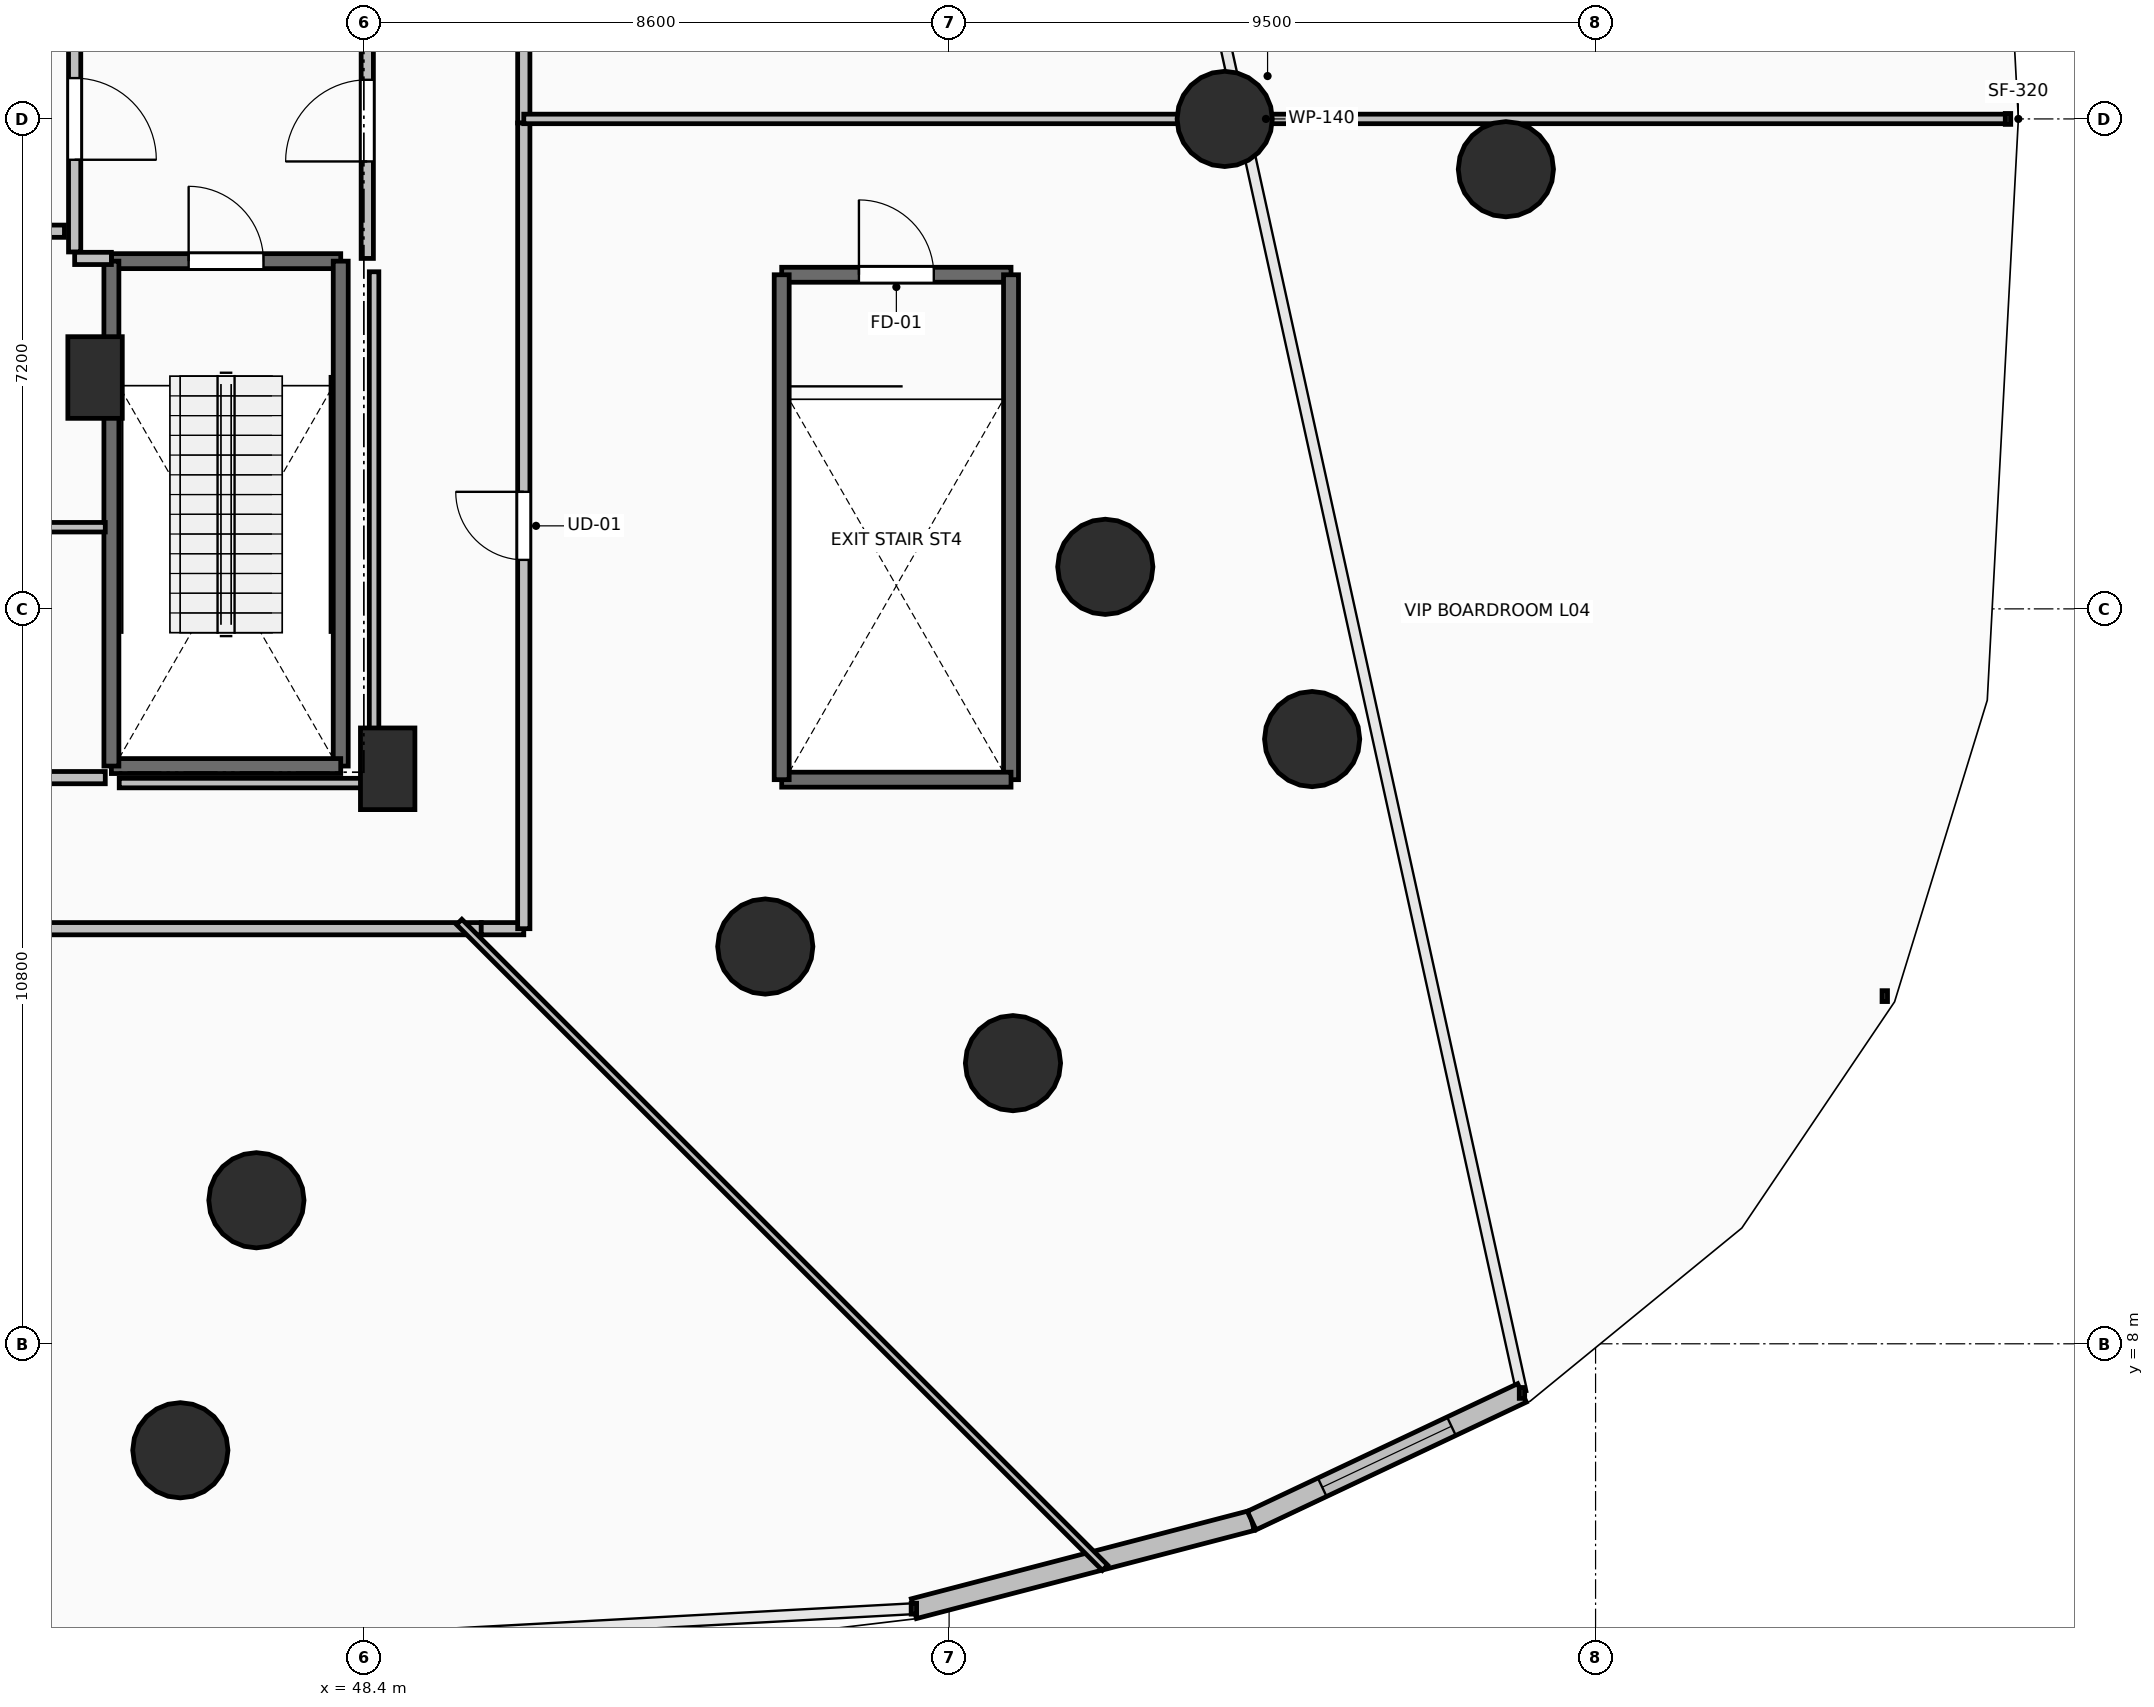
"""IFC4 building model, lengths in metres.
Left out: names, types, materials, properties, quantities, classifications, styles, units other than length and angle.
Written with IfcOpenShell. Run it as: python <this file> out.ifc"""

import sys

from ifc_helpers import new_model, si_unit, direction, frame, frame_2d, origin, origin_2d, place, context, subcontext, project, spatial, rectangle, circle, extrude, element, fill, save


model = new_model("IFC4")
c1 = context("Model", 3, precision=1e-05, world=origin(), true_north=direction((0.0, 1.0)))
c2 = subcontext(c1, "Body", "Model", "MODEL_VIEW")
j1 = project(units=[si_unit("LENGTHUNIT", "METRE"), si_unit("PLANEANGLEUNIT", "RADIAN")], contexts=[c1])
p1 = place(None, origin())
s1 = spatial("IfcSite", under=j1, at=p1, CompositionType="ELEMENT")
p2 = place(p1, origin())
s2 = spatial("IfcBuilding", under=s1, at=p2, CompositionType="ELEMENT")
p3 = place(p2, frame((0.0, 0.0, 19.2)))
s3 = spatial("IfcBuildingStorey", under=s2, at=p3, CompositionType="ELEMENT", Elevation=19.2)
for number, where, z_axis, x_axis in (
    (1, (61.05, 26.0, 0.0), (0.0, 0.0, 1.0), (1.0, 0.0, 0.0)),
    (2, (46.821, 10.109, 0.0), (0.0, 0.0, 1.0), (0.383, -0.924, 0.0)),
    (3, (54.299, 13.838, 0.0), (0.0, 0.0, 1.0), (0.707, -0.707, 0.0)),
    (4, (59.295, 19.418, 0.0), (0.0, 0.0, 1.0), (0.924, -0.383, 0.0)),
    (5, (65.182, 25.261, 0.0), (0.0, 0.0, 1.0), (1.0, 0.0, 0.0)),
    (6, (45.703, 6.435, 0.0), (0.0, 0.0, 1.0), (0.383, -0.924, 0.0)),
    (7, (57.939, 12.124, 0.0), (0.0, 0.0, 1.0), (0.707, -0.707, 0.0)),
    (8, (62.335, 16.886, 0.0), (0.0, 0.0, 1.0), (0.924, -0.383, 0.0)),
):
    element("IfcColumn", number, at=place(p3, frame(where, z_axis=z_axis, x_axis=x_axis)), inside=s3, PredefinedType="COLUMN", context=c2, shape_type="SweptSolid", body=[
        extrude(circle(Radius=0.7, at=origin_2d()), origin(), (0.0, 0.0, 1.0), 4.8),
    ])
for number, where, z_axis, x_axis in (
    (9, (48.75, 16.45, 0.0), (0.0, 0.0, 1.0), (1.0, 0.0, 0.0)),
    (10, (44.45, 22.2, 0.0), (0.0, 0.0, 1.0), (1.0, 0.0, 0.0)),
):
    element("IfcColumn", number, at=place(p3, frame(where, z_axis=z_axis, x_axis=x_axis)), inside=s3, PredefinedType="PILASTER", context=c2, shape_type="SweptSolid", body=[
        extrude(rectangle(XDim=0.8, YDim=1.2, at=origin_2d()), origin(), (0.0, 0.0, 1.0), 4.8),
    ])
p4 = place(p3, frame((56.482, 4.107, 0.0), z_axis=(0.0, 0.0, 1.0), x_axis=(0.967631926566, 0.252365716155, 0.0)))
e11 = element("IfcWall", 11, at=p4, inside=s3, PredefinedType="STANDARD", context=c2, shape_type="SweptSolid", body=[
    extrude(rectangle(XDim=5.13, YDim=0.3, at=frame_2d((2.565, 0.0))), origin(), (0.0, 0.0, 1.0), 4.54),
])
p5 = place(p3, frame((61.447, 5.402, 0.0), z_axis=(0.0, 0.0, 1.0), x_axis=(0.904206917273, 0.427094662523, 0.0)))
e12 = element("IfcWall", 12, at=p5, inside=s3, PredefinedType="STANDARD", context=c2, shape_type="SweptSolid", body=[
    extrude(rectangle(XDim=4.393, YDim=0.3, at=frame_2d((2.197, 0.0))), origin(), (0.0, 0.0, 1.0), 4.54),
])
p6 = place(p5, frame((1.146, 0.0, 0.85)))
e13 = element("IfcOpeningElement", 13, at=p6, cuts=e12, PredefinedType="OPENING", context=c2, shape_type="SweptSolid", body=[
    extrude(rectangle(XDim=2.1, YDim=2.8, at=frame_2d((1.05, 1.4))), frame((0.0, 0.165, 0.0), z_axis=(0.0, -1.0, 0.0), x_axis=(1.0, 0.0, 0.0)), (0.0, 0.0, 1.0), 0.33),
])
p7 = place(p3, frame((44.69, 23.91, 0.0), z_axis=(0.0, 0.0, 1.0), x_axis=(1.0, 0.0, 0.0)))
e14 = element("IfcWall", 14, at=p7, inside=s3, PredefinedType="SOLIDWALL", context=c2, shape_type="SweptSolid", body=[
    extrude(rectangle(XDim=3.37, YDim=0.22, at=frame_2d((1.685, 0.0))), origin(), (0.0, 0.0, 1.0), 4.54),
])
p8 = place(p7, frame((1.135, 0.0, 0.0)))
e15 = element("IfcOpeningElement", 15, at=p8, cuts=e14, PredefinedType="OPENING", context=c2, shape_type="SweptSolid", body=[
    extrude(rectangle(XDim=1.1, YDim=2.15, at=frame_2d((0.55, 1.075))), frame((0.0, 0.125, 0.0), z_axis=(0.0, -1.0, 0.0), x_axis=(1.0, 0.0, 0.0)), (0.0, 0.0, 1.0), 0.25),
])
p9 = place(p3, frame((48.06, 23.91, 0.0), z_axis=(0.0, 0.0, 1.0), x_axis=(0.0, -1.0, 0.0)))
e16 = element("IfcWall", 16, at=p9, inside=s3, PredefinedType="SOLIDWALL", context=c2, shape_type="SweptSolid", body=[
    extrude(rectangle(XDim=7.42, YDim=0.22, at=frame_2d((3.71, 0.0))), origin(), (0.0, 0.0, 1.0), 4.54),
])
p10 = place(p3, frame((48.06, 16.49, 0.0), z_axis=(0.0, 0.0, 1.0), x_axis=(-1.0, 0.0, 0.0)))
e17 = element("IfcWall", 17, at=p10, inside=s3, PredefinedType="SOLIDWALL", context=c2, shape_type="SweptSolid", body=[
    extrude(rectangle(XDim=3.37, YDim=0.22, at=frame_2d((1.685, 0.0))), origin(), (0.0, 0.0, 1.0), 4.54),
])
p11 = place(p3, frame((44.69, 16.49, 0.0), z_axis=(0.0, 0.0, 1.0), x_axis=(0.0, 1.0, 0.0)))
e18 = element("IfcWall", 18, at=p11, inside=s3, PredefinedType="SOLIDWALL", context=c2, shape_type="SweptSolid", body=[
    extrude(rectangle(XDim=7.42, YDim=0.22, at=frame_2d((3.71, 0.0))), origin(), (0.0, 0.0, 1.0), 4.54),
])
p12 = place(p3, frame((54.54, 23.71, 0.0), z_axis=(0.0, 0.0, 1.0), x_axis=(1.0, 0.0, 0.0)))
e19 = element("IfcWall", 19, at=p12, inside=s3, PredefinedType="SOLIDWALL", context=c2, shape_type="SweptSolid", body=[
    extrude(rectangle(XDim=3.37, YDim=0.22, at=frame_2d((1.685, 0.0))), origin(), (0.0, 0.0, 1.0), 4.54),
])
p13 = place(p12, frame((1.135, 0.0, 0.0)))
e20 = element("IfcOpeningElement", 20, at=p13, cuts=e19, PredefinedType="OPENING", context=c2, shape_type="SweptSolid", body=[
    extrude(rectangle(XDim=1.1, YDim=2.15, at=frame_2d((0.55, 1.075))), frame((0.0, 0.125, 0.0), z_axis=(0.0, -1.0, 0.0), x_axis=(1.0, 0.0, 0.0)), (0.0, 0.0, 1.0), 0.25),
])
p14 = place(p3, frame((57.91, 23.71, 0.0), z_axis=(0.0, 0.0, 1.0), x_axis=(0.0, -1.0, 0.0)))
e21 = element("IfcWall", 21, at=p14, inside=s3, PredefinedType="SOLIDWALL", context=c2, shape_type="SweptSolid", body=[
    extrude(rectangle(XDim=7.42, YDim=0.22, at=frame_2d((3.71, 0.0))), origin(), (0.0, 0.0, 1.0), 4.54),
])
p15 = place(p3, frame((57.91, 16.29, 0.0), z_axis=(0.0, 0.0, 1.0), x_axis=(-1.0, 0.0, 0.0)))
e22 = element("IfcWall", 22, at=p15, inside=s3, PredefinedType="SOLIDWALL", context=c2, shape_type="SweptSolid", body=[
    extrude(rectangle(XDim=3.37, YDim=0.22, at=frame_2d((1.685, 0.0))), origin(), (0.0, 0.0, 1.0), 4.54),
])
p16 = place(p3, frame((54.54, 16.29, 0.0), z_axis=(0.0, 0.0, 1.0), x_axis=(0.0, 1.0, 0.0)))
e23 = element("IfcWall", 23, at=p16, inside=s3, PredefinedType="SOLIDWALL", context=c2, shape_type="SweptSolid", body=[
    extrude(rectangle(XDim=7.42, YDim=0.22, at=frame_2d((3.71, 0.0))), origin(), (0.0, 0.0, 1.0), 4.54),
])
p17 = place(p3, frame((44.15, 27.955, 0.0), z_axis=(0.0, 0.0, 1.0), x_axis=(0.0, -1.0, 0.0)))
e24 = element("IfcWall", 24, at=p17, inside=s3, PredefinedType="PARTITIONING", context=c2, shape_type="SweptSolid", body=[
    extrude(rectangle(XDim=3.91, YDim=0.18, at=frame_2d((1.955, 0.0))), origin(), (0.0, 0.0, 1.0), 4.54),
])
p18 = place(p17, frame((1.355, 0.0, 0.0)))
e25 = element("IfcOpeningElement", 25, at=p18, cuts=e24, PredefinedType="OPENING", context=c2, shape_type="SweptSolid", body=[
    extrude(rectangle(XDim=1.2, YDim=2.15, at=frame_2d((0.6, 1.075))), frame((0.0, 0.105, 0.0), z_axis=(0.0, -1.0, 0.0), x_axis=(1.0, 0.0, 0.0)), (0.0, 0.0, 1.0), 0.21),
])
p19 = place(p3, frame((44.15, 23.95, 0.0), z_axis=(0.0, 0.0, 1.0), x_axis=(1.0, 0.0, 0.0)))
e26 = element("IfcWall", 26, at=p19, inside=s3, PredefinedType="PARTITIONING", context=c2, shape_type="SweptSolid", body=[
    extrude(rectangle(XDim=0.54, YDim=0.18, at=frame_2d((0.27, 0.0))), origin(), (0.0, 0.0, 1.0), 4.54),
])
p20 = place(p3, frame((48.45, 23.95, 0.0), z_axis=(0.0, 0.0, 1.0), x_axis=(0.0, 1.0, 0.0)))
e27 = element("IfcWall", 27, at=p20, inside=s3, PredefinedType="PARTITIONING", context=c2, shape_type="SweptSolid", body=[
    extrude(rectangle(XDim=4.05, YDim=0.18, at=frame_2d((2.025, 0.0))), origin(), (0.0, 0.0, 1.0), 4.54),
])
p21 = place(p20, frame((1.425, 0.0, 0.0)))
e28 = element("IfcOpeningElement", 28, at=p21, cuts=e27, PredefinedType="OPENING", context=c2, shape_type="SweptSolid", body=[
    extrude(rectangle(XDim=1.2, YDim=2.15, at=frame_2d((0.6, 1.075))), frame((0.0, 0.105, 0.0), z_axis=(0.0, -1.0, 0.0), x_axis=(1.0, 0.0, 0.0)), (0.0, 0.0, 1.0), 0.21),
])
p22 = place(p3, frame((41.555, 24.35, 0.0), z_axis=(0.0, 0.0, 1.0), x_axis=(1.0, 0.0, 0.0)))
e29 = element("IfcWall", 29, at=p22, inside=s3, PredefinedType="PARTITIONING", context=c2, shape_type="SweptSolid", body=[
    extrude(rectangle(XDim=2.445, YDim=0.18, at=frame_2d((1.223, 0.0))), origin(), (0.0, 0.0, 1.0), 4.54),
])
p23 = place(p22, frame((0.798, 0.0, 0.0)))
e30 = element("IfcOpeningElement", 30, at=p23, cuts=e29, PredefinedType="OPENING", context=c2, shape_type="SweptSolid", body=[
    extrude(rectangle(XDim=0.85, YDim=2.1, at=frame_2d((0.425, 1.05))), frame((0.0, 0.105, 0.0), z_axis=(0.0, -1.0, 0.0), x_axis=(1.0, 0.0, 0.0)), (0.0, 0.0, 1.0), 0.21),
])
p24 = place(p3, frame((44.6, 20.0, 0.0), z_axis=(0.0, 0.0, 1.0), x_axis=(-1.0, 0.0, 0.0)))
e31 = element("IfcWall", 31, at=p24, inside=s3, PredefinedType="PARTITIONING", context=c2, shape_type="SweptSolid", body=[
    extrude(rectangle(XDim=3.2, YDim=0.14, at=frame_2d((1.6, 0.0))), origin(), (0.0, 0.0, 1.0), 4.54),
])
p25 = place(p3, frame((41.4, 16.32, 0.0), z_axis=(0.0, 0.0, 1.0), x_axis=(1.0, 0.0, 0.0)))
e32 = element("IfcWall", 32, at=p25, inside=s3, PredefinedType="PARTITIONING", context=c2, shape_type="SweptSolid", body=[
    extrude(rectangle(XDim=3.2, YDim=0.18, at=frame_2d((1.6, 0.0))), origin(), (0.0, 0.0, 1.0), 4.54),
])
p26 = place(p25, frame((1.2, 0.0, 0.0)))
e33 = element("IfcOpeningElement", 33, at=p26, cuts=e32, PredefinedType="OPENING", context=c2, shape_type="SweptSolid", body=[
    extrude(rectangle(XDim=0.8, YDim=2.05, at=frame_2d((0.4, 1.025))), frame((0.0, 0.105, 0.0), z_axis=(0.0, -1.0, 0.0), x_axis=(1.0, 0.0, 0.0)), (0.0, 0.0, 1.0), 0.21),
])
p27 = place(p3, frame((50.75, 25.94, 0.0), z_axis=(0.0, 0.0, 1.0), x_axis=(0.0, 1.0, 0.0)))
e34 = element("IfcWall", 34, at=p27, inside=s3, PredefinedType="PARTITIONING", context=c2, shape_type="SweptSolid", body=[
    extrude(rectangle(XDim=10.01, YDim=0.18, at=frame_2d((5.005, 0.0))), origin(), (0.0, 0.0, 1.0), 3.732),
])
p28 = place(p3, frame((42.2, 14.1, 0.0), z_axis=(0.0, 0.0, 1.0), x_axis=(1.0, 0.0, 0.0)))
e35 = element("IfcWall", 35, at=p28, inside=s3, PredefinedType="PARTITIONING", context=c2, shape_type="SweptSolid", body=[
    extrude(rectangle(XDim=7.925, YDim=0.18, at=frame_2d((3.962, 0.0))), origin(), (0.0, 0.0, 1.0), 3.732),
])
p29 = place(p3, frame((50.125, 14.1, 0.0), z_axis=(0.0, 0.0, 1.0), x_axis=(1.0, 0.0, 0.0)))
e36 = element("IfcWall", 36, at=p29, inside=s3, PredefinedType="PARTITIONING", context=c2, shape_type="SweptSolid", body=[
    extrude(rectangle(XDim=0.625, YDim=0.18, at=frame_2d((0.312, 0.0))), origin(), (0.0, 0.0, 1.0), 4.222),
])
p30 = place(p3, frame((50.75, 14.1, 0.0), z_axis=(0.0, 0.0, 1.0), x_axis=(0.0, 1.0, 0.0)))
e37 = element("IfcWall", 37, at=p30, inside=s3, PredefinedType="PARTITIONING", context=c2, shape_type="SweptSolid", body=[
    extrude(rectangle(XDim=11.84, YDim=0.18, at=frame_2d((5.92, 0.0))), origin(), (0.0, 0.0, 1.0), 3.732),
])
p31 = place(p30, frame((5.42, 0.0, 0.0)))
e38 = element("IfcOpeningElement", 38, at=p31, cuts=e37, PredefinedType="OPENING", context=c2, shape_type="SweptSolid", body=[
    extrude(rectangle(XDim=1.0, YDim=2.15, at=frame_2d((0.5, 1.075))), frame((0.0, 0.105, 0.0), z_axis=(0.0, -1.0, 0.0), x_axis=(1.0, 0.0, 0.0)), (0.0, 0.0, 1.0), 0.21),
])
p32 = place(p3, frame((50.75, 26.0, 0.0), z_axis=(0.0, 0.0, 1.0), x_axis=(1.0, 0.0, 0.0)))
e39 = element("IfcWall", 39, at=p32, inside=s3, PredefinedType="PARTITIONING", context=c2, shape_type="SweptSolid", body=[
    extrude(rectangle(XDim=21.813, YDim=0.14, at=frame_2d((10.906, 0.0))), origin(), (0.0, 0.0, 1.0), 3.732),
])
p33 = place(p3, frame((59.291, 4.709, 0.0), z_axis=(0.0, 0.0, 1.0), x_axis=(-0.707106781187, 0.707106781187, 0.0)))
e40 = element("IfcWall", 40, at=p33, inside=s3, PredefinedType="PARTITIONING", context=c2, shape_type="SweptSolid", body=[
    extrude(rectangle(XDim=13.421, YDim=0.11, at=frame_2d((6.71, 0.0))), origin(), (0.0, 0.0, 1.0), 3.829),
])
p34 = place(p3, frame((48.55, 23.754, 0.0), z_axis=(0.0, 0.0, 1.0), x_axis=(0.0, -1.0, 0.0)))
e41 = element("IfcWall", 41, at=p34, inside=s3, PredefinedType="PARTITIONING", context=c2, shape_type="SweptSolid", body=[
    extrude(rectangle(XDim=7.514, YDim=0.14, at=frame_2d((3.757, 0.0))), origin(), (0.0, 0.0, 1.0), 3.732),
])
p35 = place(p3, frame((48.55, 16.24, 0.0), z_axis=(0.0, 0.0, 1.0), x_axis=(-1.0, 0.0, 0.0)))
e42 = element("IfcWall", 42, at=p35, inside=s3, PredefinedType="PARTITIONING", context=c2, shape_type="SweptSolid", body=[
    extrude(rectangle(XDim=3.745, YDim=0.14, at=frame_2d((1.873, 0.0))), origin(), (0.0, 0.0, 1.0), 3.732),
])
p36 = place(p6, origin())
e43 = element("IfcWindow", 43, at=p36, inside=s3, PartitioningType="SINGLE_PANEL", PredefinedType="WINDOW", context=c2, shape_type="SweptSolid", body=[
    extrude(rectangle(XDim=2.1, YDim=2.8, at=frame_2d((1.05, 1.4))), frame((0.0, 0.03, 0.0), z_axis=(0.0, -1.0, 0.0), x_axis=(1.0, 0.0, 0.0)), (0.0, 0.0, 1.0), 0.06),
])
fill(e13, e43)
p37 = place(p8, origin())
e44 = element("IfcDoor", 44, at=p37, inside=s3, OperationType="SINGLE_SWING_LEFT", PredefinedType="DOOR", context=c2, shape_type="SweptSolid", body=[
    extrude(rectangle(XDim=1.1, YDim=2.15, at=frame_2d((0.55, 1.075))), frame((0.0, 0.025, 0.0), z_axis=(0.0, -1.0, 0.0), x_axis=(1.0, 0.0, 0.0)), (0.0, 0.0, 1.0), 0.05),
])
fill(e15, e44)
p38 = place(p13, origin())
e45 = element("IfcDoor", 45, at=p38, inside=s3, OperationType="SINGLE_SWING_LEFT", PredefinedType="DOOR", context=c2, shape_type="SweptSolid", body=[
    extrude(rectangle(XDim=1.1, YDim=2.15, at=frame_2d((0.55, 1.075))), frame((0.0, 0.025, 0.0), z_axis=(0.0, -1.0, 0.0), x_axis=(1.0, 0.0, 0.0)), (0.0, 0.0, 1.0), 0.05),
])
fill(e20, e45)
p39 = place(p18, origin())
e46 = element("IfcDoor", 46, at=p39, inside=s3, OperationType="SINGLE_SWING_RIGHT", PredefinedType="DOOR", context=c2, shape_type="SweptSolid", body=[
    extrude(rectangle(XDim=1.2, YDim=2.15, at=frame_2d((0.6, 1.075))), frame((0.0, 0.025, 0.0), z_axis=(0.0, -1.0, 0.0), x_axis=(1.0, 0.0, 0.0)), (0.0, 0.0, 1.0), 0.05),
])
fill(e25, e46)
p40 = place(p21, origin())
e47 = element("IfcDoor", 47, at=p40, inside=s3, OperationType="SINGLE_SWING_LEFT", PredefinedType="DOOR", context=c2, shape_type="SweptSolid", body=[
    extrude(rectangle(XDim=1.2, YDim=2.15, at=frame_2d((0.6, 1.075))), frame((0.0, 0.025, 0.0), z_axis=(0.0, -1.0, 0.0), x_axis=(1.0, 0.0, 0.0)), (0.0, 0.0, 1.0), 0.05),
])
fill(e28, e47)
p41 = place(p31, origin())
e48 = element("IfcDoor", 48, at=p41, inside=s3, OperationType="SINGLE_SWING_RIGHT", PredefinedType="DOOR", context=c2, shape_type="SweptSolid", body=[
    extrude(rectangle(XDim=1.0, YDim=2.15, at=frame_2d((0.5, 1.075))), frame((0.0, 0.025, 0.0), z_axis=(0.0, -1.0, 0.0), x_axis=(1.0, 0.0, 0.0)), (0.0, 0.0, 1.0), 0.05),
])
fill(e38, e48)
save(model, sys.argv[1])
